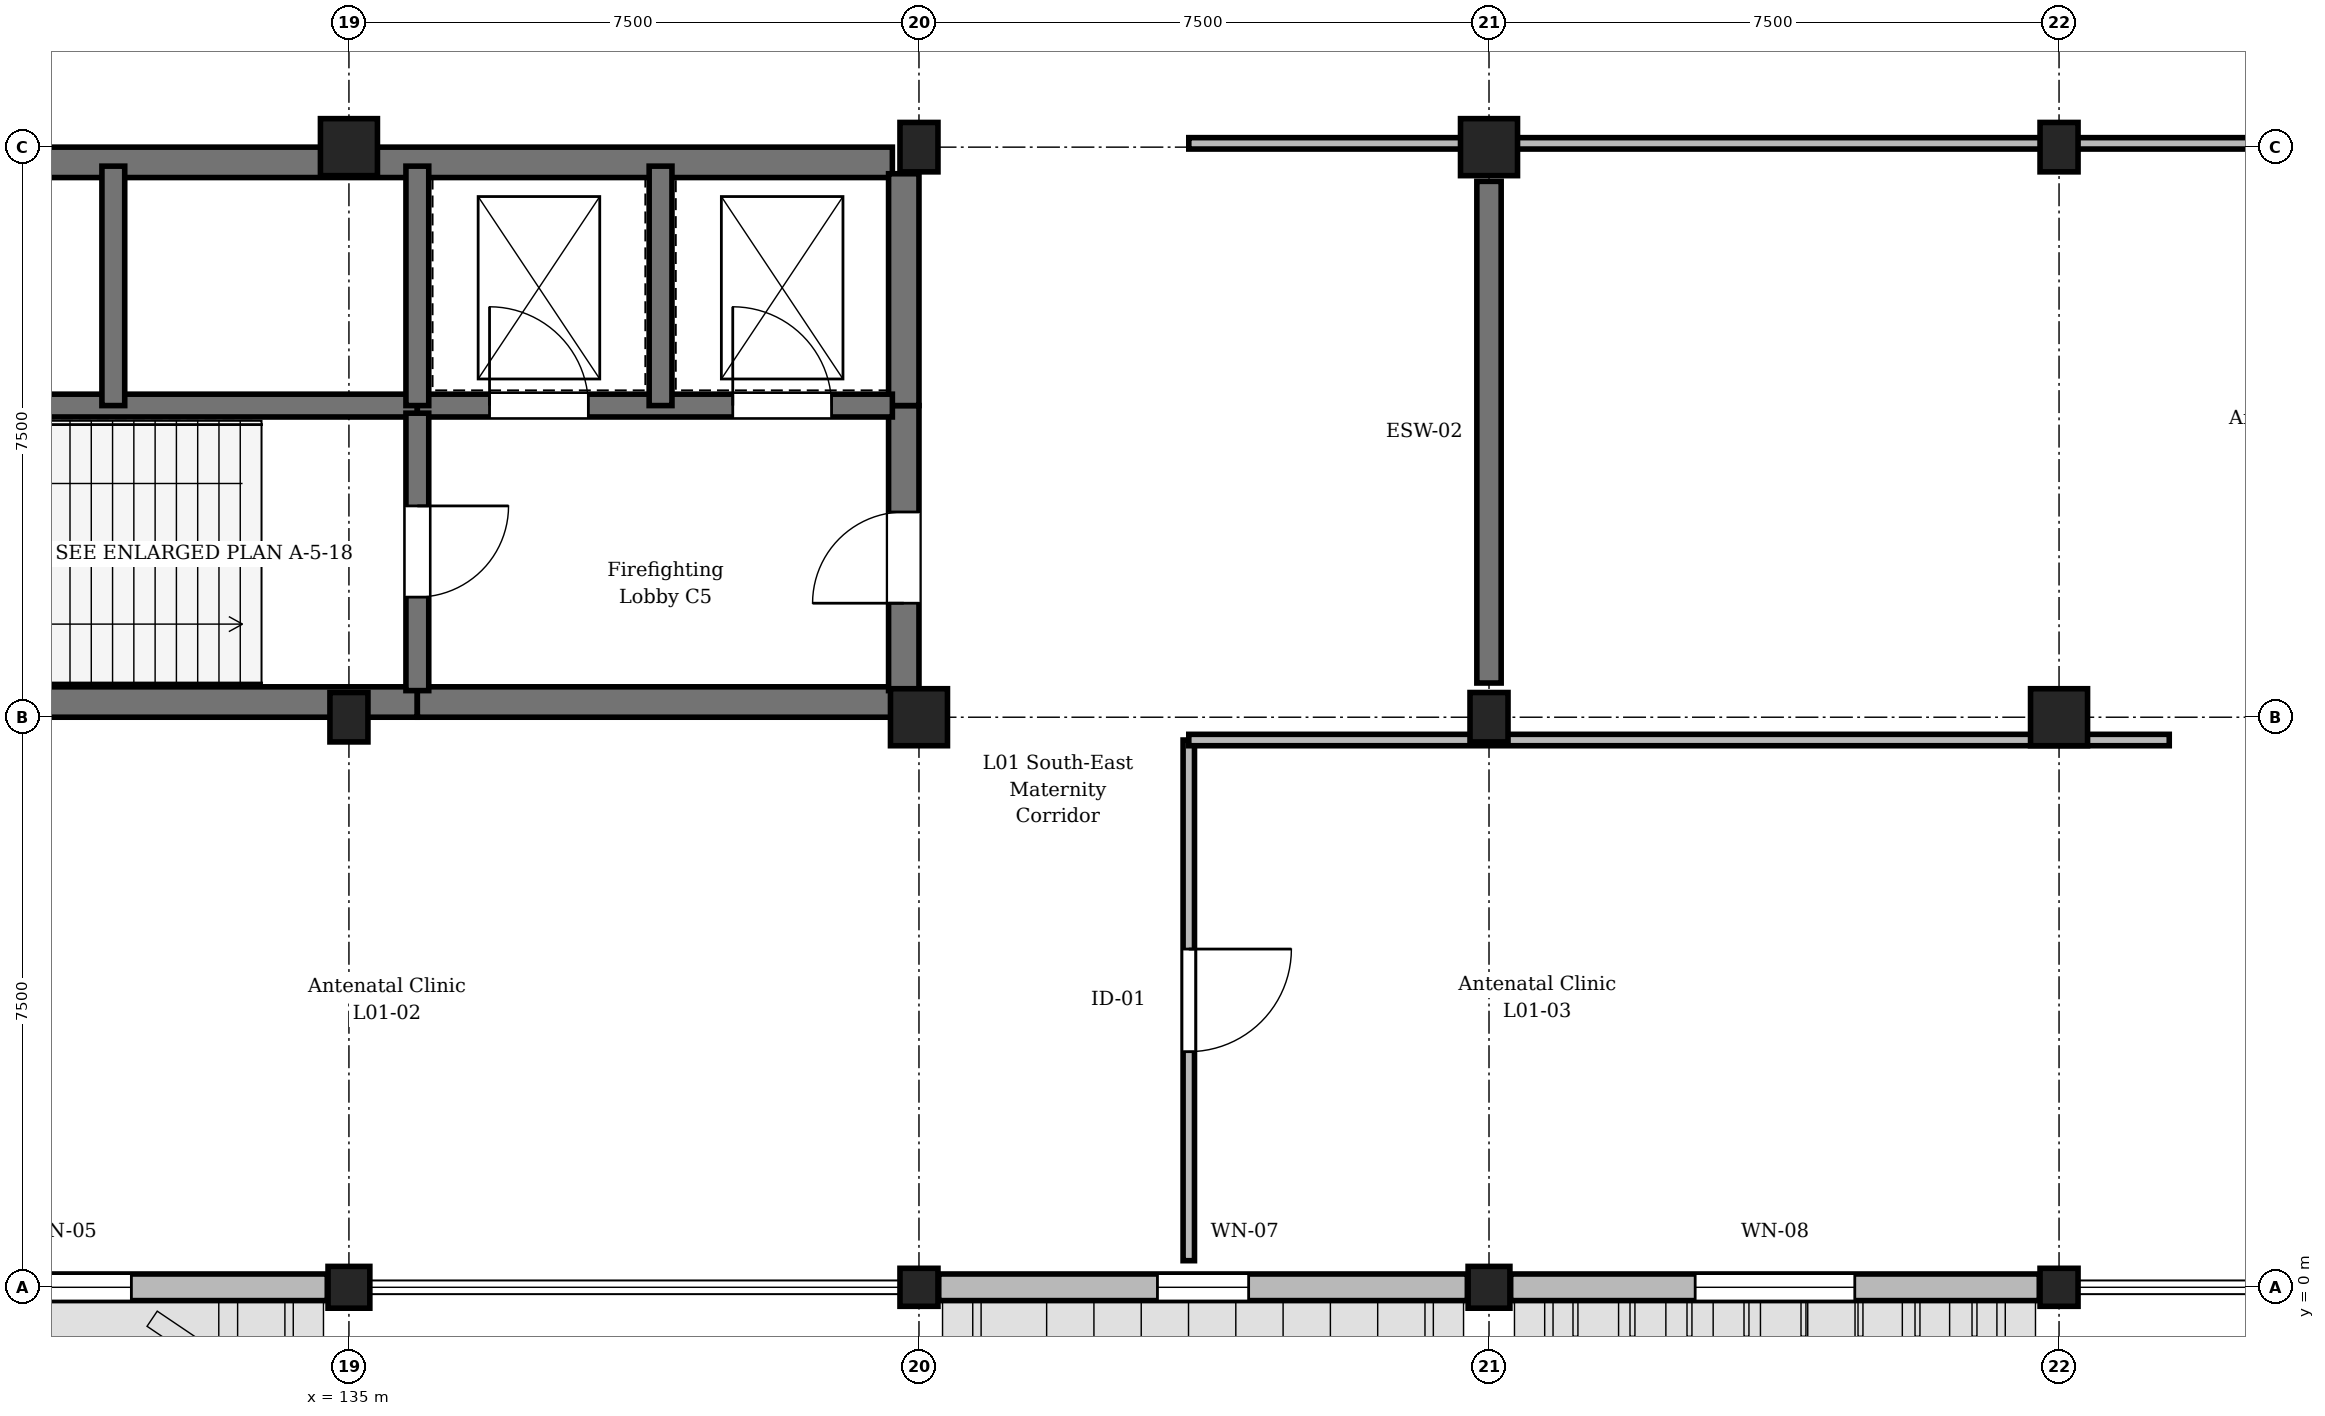
"""IFC4 building model, lengths in metres.
Left out: names, types, materials, properties, quantities, classifications, styles, units other than length and angle.
Written with IfcOpenShell. Run it as: python <this file> out.ifc"""

import sys

from ifc_helpers import new_model, si_unit, direction, frame, frame_2d, origin, origin_2d, place, context, subcontext, project, spatial, rectangle, extrude, element, fill, save


model = new_model("IFC4")
c1 = context("Model", 3, precision=1e-05, world=origin(), true_north=direction((0.0, 1.0)))
c2 = subcontext(c1, "Body", "Model", "MODEL_VIEW")
j1 = project(units=[si_unit("LENGTHUNIT", "METRE"), si_unit("PLANEANGLEUNIT", "RADIAN")], contexts=[c1])
p1 = place(None, origin())
s1 = spatial("IfcSite", under=j1, at=p1, CompositionType="ELEMENT")
p2 = place(p1, origin())
s2 = spatial("IfcBuilding", under=s1, at=p2, CompositionType="ELEMENT")
p3 = place(p2, frame((0.0, 0.0, 4.8)))
s3 = spatial("IfcBuildingStorey", under=s2, at=p3, CompositionType="ELEMENT", Elevation=4.8)
p4 = place(p3, frame((135.0, 0.0, 0.0), z_axis=(0.0, 0.0, 1.0), x_axis=(1.0, 0.0, 0.0)))
e1 = element("IfcColumn", 1, at=p4, inside=s3, PredefinedType="COLUMN", context=c2, shape_type="SweptSolid", body=[
    extrude(rectangle(XDim=0.55, YDim=0.55, at=origin_2d()), origin(), (0.0, 0.0, 1.0), 4.5),
])
p5 = place(p3, frame((135.0, 7.5, 0.0), z_axis=(0.0, 0.0, 1.0), x_axis=(1.0, 0.0, 0.0)))
e2 = element("IfcColumn", 2, at=p5, inside=s3, PredefinedType="COLUMN", context=c2, shape_type="SweptSolid", body=[
    extrude(rectangle(XDim=0.5, YDim=0.65, at=origin_2d()), origin(), (0.0, 0.0, 1.0), 4.5),
])
p6 = place(p3, frame((135.0, 15.0, 0.0), z_axis=(0.0, 0.0, 1.0), x_axis=(1.0, 0.0, 0.0)))
e3 = element("IfcColumn", 3, at=p6, inside=s3, PredefinedType="COLUMN", context=c2, shape_type="SweptSolid", body=[
    extrude(rectangle(XDim=0.75, YDim=0.75, at=origin_2d()), origin(), (0.0, 0.0, 1.0), 4.5),
])
p7 = place(p3, frame((142.5, 0.0, 0.0), z_axis=(0.0, 0.0, 1.0), x_axis=(1.0, 0.0, 0.0)))
e4 = element("IfcColumn", 4, at=p7, inside=s3, PredefinedType="COLUMN", context=c2, shape_type="SweptSolid", body=[
    extrude(rectangle(XDim=0.5, YDim=0.5, at=origin_2d()), origin(), (0.0, 0.0, 1.0), 4.5),
])
p8 = place(p3, frame((142.5, 7.5, 0.0), z_axis=(0.0, 0.0, 1.0), x_axis=(1.0, 0.0, 0.0)))
e5 = element("IfcColumn", 5, at=p8, inside=s3, PredefinedType="COLUMN", context=c2, shape_type="SweptSolid", body=[
    extrude(rectangle(XDim=0.75, YDim=0.75, at=origin_2d()), origin(), (0.0, 0.0, 1.0), 4.5),
])
p9 = place(p3, frame((142.5, 15.0, 0.0), z_axis=(0.0, 0.0, 1.0), x_axis=(1.0, 0.0, 0.0)))
e6 = element("IfcColumn", 6, at=p9, inside=s3, PredefinedType="COLUMN", context=c2, shape_type="SweptSolid", body=[
    extrude(rectangle(XDim=0.5, YDim=0.65, at=origin_2d()), origin(), (0.0, 0.0, 1.0), 4.5),
])
p10 = place(p3, frame((150.0, 0.0, 0.0), z_axis=(0.0, 0.0, 1.0), x_axis=(1.0, 0.0, 0.0)))
e7 = element("IfcColumn", 7, at=p10, inside=s3, PredefinedType="COLUMN", context=c2, shape_type="SweptSolid", body=[
    extrude(rectangle(XDim=0.55, YDim=0.55, at=origin_2d()), origin(), (0.0, 0.0, 1.0), 4.5),
])
p11 = place(p3, frame((150.0, 7.5, 0.0), z_axis=(0.0, 0.0, 1.0), x_axis=(1.0, 0.0, 0.0)))
e8 = element("IfcColumn", 8, at=p11, inside=s3, PredefinedType="COLUMN", context=c2, shape_type="SweptSolid", body=[
    extrude(rectangle(XDim=0.5, YDim=0.65, at=origin_2d()), origin(), (0.0, 0.0, 1.0), 4.5),
])
p12 = place(p3, frame((150.0, 15.0, 0.0), z_axis=(0.0, 0.0, 1.0), x_axis=(1.0, 0.0, 0.0)))
e9 = element("IfcColumn", 9, at=p12, inside=s3, PredefinedType="COLUMN", context=c2, shape_type="SweptSolid", body=[
    extrude(rectangle(XDim=0.75, YDim=0.75, at=origin_2d()), origin(), (0.0, 0.0, 1.0), 4.5),
])
p13 = place(p3, frame((157.5, 0.0, 0.0), z_axis=(0.0, 0.0, 1.0), x_axis=(1.0, 0.0, 0.0)))
e10 = element("IfcColumn", 10, at=p13, inside=s3, PredefinedType="COLUMN", context=c2, shape_type="SweptSolid", body=[
    extrude(rectangle(XDim=0.5, YDim=0.5, at=origin_2d()), origin(), (0.0, 0.0, 1.0), 4.5),
])
p14 = place(p3, frame((157.5, 7.5, 0.0), z_axis=(0.0, 0.0, 1.0), x_axis=(1.0, 0.0, 0.0)))
e11 = element("IfcColumn", 11, at=p14, inside=s3, PredefinedType="COLUMN", context=c2, shape_type="SweptSolid", body=[
    extrude(rectangle(XDim=0.75, YDim=0.75, at=origin_2d()), origin(), (0.0, 0.0, 1.0), 4.5),
])
p15 = place(p3, frame((157.5, 15.0, 0.0), z_axis=(0.0, 0.0, 1.0), x_axis=(1.0, 0.0, 0.0)))
e12 = element("IfcColumn", 12, at=p15, inside=s3, PredefinedType="COLUMN", context=c2, shape_type="SweptSolid", body=[
    extrude(rectangle(XDim=0.5, YDim=0.65, at=origin_2d()), origin(), (0.0, 0.0, 1.0), 4.5),
])
p16 = place(p3, frame((150.0, 7.95, 0.0), z_axis=(0.0, 0.0, 1.0), x_axis=(0.0, 1.0, 0.0)))
e13 = element("IfcWall", 13, at=p16, inside=s3, PredefinedType="SHEAR", context=c2, shape_type="SweptSolid", body=[
    extrude(rectangle(XDim=6.6, YDim=0.32, at=frame_2d((3.3, 0.0))), origin(), (0.0, 0.0, 1.0), 3.63),
])
p17 = place(p3, frame((134.715, 0.0, 0.0), z_axis=(0.0, 0.0, 1.0), x_axis=(-1.0, 0.0, 0.0)))
e14 = element("IfcWall", 14, at=p17, inside=s3, PredefinedType="STANDARD", context=c2, shape_type="SweptSolid", body=[
    extrude(rectangle(XDim=6.955, YDim=0.35, at=frame_2d((3.478, 0.0))), origin(), (0.0, 0.0, 1.0), 3.63),
])
p18 = place(p17, frame((2.577, 0.0, 0.9)))
e15 = element("IfcOpeningElement", 15, at=p18, cuts=e14, PredefinedType="OPENING", context=c2, shape_type="SweptSolid", body=[
    extrude(rectangle(XDim=1.8, YDim=2.1, at=frame_2d((0.9, 1.05))), frame((0.0, 0.185, 0.0), z_axis=(0.0, -1.0, 0.0), x_axis=(1.0, 0.0, 0.0)), (0.0, 0.0, 1.0), 0.37),
])
p19 = place(p3, frame((149.715, 0.0, 0.0), z_axis=(0.0, 0.0, 1.0), x_axis=(-1.0, 0.0, 0.0)))
e16 = element("IfcWall", 16, at=p19, inside=s3, PredefinedType="STANDARD", context=c2, shape_type="SweptSolid", body=[
    extrude(rectangle(XDim=6.955, YDim=0.35, at=frame_2d((3.478, 0.0))), origin(), (0.0, 0.0, 1.0), 3.63),
])
p20 = place(p19, frame((2.877, 0.0, 0.9)))
e17 = element("IfcOpeningElement", 17, at=p20, cuts=e16, PredefinedType="OPENING", context=c2, shape_type="SweptSolid", body=[
    extrude(rectangle(XDim=1.2, YDim=2.1, at=frame_2d((0.6, 1.05))), frame((0.0, 0.185, 0.0), z_axis=(0.0, -1.0, 0.0), x_axis=(1.0, 0.0, 0.0)), (0.0, 0.0, 1.0), 0.37),
])
p21 = place(p3, frame((157.24, 0.0, 0.0), z_axis=(0.0, 0.0, 1.0), x_axis=(-1.0, 0.0, 0.0)))
e18 = element("IfcWall", 18, at=p21, inside=s3, PredefinedType="STANDARD", context=c2, shape_type="SweptSolid", body=[
    extrude(rectangle(XDim=6.955, YDim=0.35, at=frame_2d((3.478, 0.0))), origin(), (0.0, 0.0, 1.0), 3.63),
])
p22 = place(p21, frame((2.427, 0.0, 0.9)))
e19 = element("IfcOpeningElement", 19, at=p22, cuts=e18, PredefinedType="OPENING", context=c2, shape_type="SweptSolid", body=[
    extrude(rectangle(XDim=2.1, YDim=2.1, at=frame_2d((1.05, 1.05))), frame((0.0, 0.185, 0.0), z_axis=(0.0, -1.0, 0.0), x_axis=(1.0, 0.0, 0.0)), (0.0, 0.0, 1.0), 0.37),
])
p23 = place(p3, frame((127.85, 7.7, 0.0), z_axis=(0.0, 0.0, 1.0), x_axis=(1.0, 0.0, 0.0)))
e20 = element("IfcWall", 20, at=p23, inside=s3, PredefinedType="SHEAR", context=c2, shape_type="SweptSolid", body=[
    extrude(rectangle(XDim=8.05, YDim=0.4, at=frame_2d((4.025, 0.0))), origin(), (0.0, 0.0, 1.0), 4.18),
])
p24 = place(p3, frame((135.9, 7.7, 0.0), z_axis=(0.0, 0.0, 1.0), x_axis=(1.0, 0.0, 0.0)))
e21 = element("IfcWall", 21, at=p24, inside=s3, PredefinedType="SHEAR", context=c2, shape_type="SweptSolid", body=[
    extrude(rectangle(XDim=6.25, YDim=0.4, at=frame_2d((3.125, 0.0))), origin(), (0.0, 0.0, 1.0), 4.18),
])
p25 = place(p3, frame((127.85, 14.8, 0.0), z_axis=(0.0, 0.0, 1.0), x_axis=(1.0, 0.0, 0.0)))
e22 = element("IfcWall", 22, at=p25, inside=s3, PredefinedType="SHEAR", context=c2, shape_type="SweptSolid", body=[
    extrude(rectangle(XDim=14.3, YDim=0.4, at=frame_2d((7.15, 0.0))), origin(), (0.0, 0.0, 1.0), 4.18),
])
p26 = place(p3, frame((142.3, 7.85, 0.0), z_axis=(0.0, 0.0, 1.0), x_axis=(0.0, 1.0, 0.0)))
e23 = element("IfcWall", 23, at=p26, inside=s3, PredefinedType="SHEAR", context=c2, shape_type="SweptSolid", body=[
    extrude(rectangle(XDim=3.75, YDim=0.4, at=frame_2d((1.875, 0.0))), origin(), (0.0, 0.0, 1.0), 4.18),
])
p27 = place(p26, frame((1.15, 0.0, 0.0)))
e24 = element("IfcOpeningElement", 24, at=p27, cuts=e23, PredefinedType="OPENING", context=c2, shape_type="SweptSolid", body=[
    extrude(rectangle(XDim=1.2, YDim=2.25, at=frame_2d((0.6, 1.125))), frame((0.0, 0.21, 0.0), z_axis=(0.0, -1.0, 0.0), x_axis=(1.0, 0.0, 0.0)), (0.0, 0.0, 1.0), 0.42),
])
p28 = place(p3, frame((142.3, 11.6, 0.0), z_axis=(0.0, 0.0, 1.0), x_axis=(0.0, 1.0, 0.0)))
e25 = element("IfcWall", 25, at=p28, inside=s3, PredefinedType="SHEAR", context=c2, shape_type="SweptSolid", body=[
    extrude(rectangle(XDim=3.05, YDim=0.4, at=frame_2d((1.525, 0.0))), origin(), (0.0, 0.0, 1.0), 4.18),
])
p29 = place(p3, frame((127.85, 11.6, 0.0), z_axis=(0.0, 0.0, 1.0), x_axis=(1.0, 0.0, 0.0)))
e26 = element("IfcWall", 26, at=p29, inside=s3, PredefinedType="SHEAR", context=c2, shape_type="SweptSolid", body=[
    extrude(rectangle(XDim=8.05, YDim=0.3, at=frame_2d((4.025, 0.0))), origin(), (0.0, 0.0, 1.0), 4.18),
])
p30 = place(p3, frame((135.9, 11.6, 0.0), z_axis=(0.0, 0.0, 1.0), x_axis=(1.0, 0.0, 0.0)))
e27 = element("IfcWall", 27, at=p30, inside=s3, PredefinedType="SHEAR", context=c2, shape_type="SweptSolid", body=[
    extrude(rectangle(XDim=6.25, YDim=0.3, at=frame_2d((3.125, 0.0))), origin(), (0.0, 0.0, 1.0), 4.18),
])
p31 = place(p30, frame((0.95, 0.0, 0.0)))
e28 = element("IfcOpeningElement", 28, at=p31, cuts=e27, PredefinedType="OPENING", context=c2, shape_type="SweptSolid", body=[
    extrude(rectangle(XDim=1.3, YDim=2.2, at=frame_2d((0.65, 1.1))), frame((0.0, 0.16, 0.0), z_axis=(0.0, -1.0, 0.0), x_axis=(1.0, 0.0, 0.0)), (0.0, 0.0, 1.0), 0.32),
])
p32 = place(p30, frame((4.15, 0.0, 0.0)))
e29 = element("IfcOpeningElement", 29, at=p32, cuts=e27, PredefinedType="OPENING", context=c2, shape_type="SweptSolid", body=[
    extrude(rectangle(XDim=1.3, YDim=2.2, at=frame_2d((0.65, 1.1))), frame((0.0, 0.16, 0.0), z_axis=(0.0, -1.0, 0.0), x_axis=(1.0, 0.0, 0.0)), (0.0, 0.0, 1.0), 0.32),
])
p33 = place(p3, frame((135.9, 11.5, 0.0), z_axis=(0.0, 0.0, 1.0), x_axis=(0.0, -1.0, 0.0)))
e30 = element("IfcWall", 30, at=p33, inside=s3, PredefinedType="SHEAR", context=c2, shape_type="SweptSolid", body=[
    extrude(rectangle(XDim=3.65, YDim=0.3, at=frame_2d((1.825, 0.0))), origin(), (0.0, 0.0, 1.0), 4.18),
])
p34 = place(p33, frame((1.22, 0.0, 0.0)))
e31 = element("IfcOpeningElement", 31, at=p34, cuts=e30, PredefinedType="OPENING", context=c2, shape_type="SweptSolid", body=[
    extrude(rectangle(XDim=1.2, YDim=2.25, at=frame_2d((0.6, 1.125))), frame((0.0, 0.16, 0.0), z_axis=(0.0, -1.0, 0.0), x_axis=(1.0, 0.0, 0.0)), (0.0, 0.0, 1.0), 0.32),
])
for number, where, z_axis, x_axis in (
    (32, (131.9, 11.6, 0.0), (0.0, 0.0, 1.0), (0.0, 1.0, 0.0)),
    (33, (135.9, 11.6, 0.0), (0.0, 0.0, 1.0), (0.0, 1.0, 0.0)),
    (34, (139.1, 11.6, 0.0), (0.0, 0.0, 1.0), (0.0, 1.0, 0.0)),
):
    element("IfcWall", number, at=place(p3, frame(where, z_axis=z_axis, x_axis=x_axis)), inside=s3, PredefinedType="SHEAR", context=c2, shape_type="SweptSolid", body=[
        extrude(rectangle(XDim=3.15, YDim=0.3, at=frame_2d((1.575, 0.0))), origin(), (0.0, 0.0, 1.0), 4.18),
    ])
p35 = place(p3, frame((146.05, 7.2, 0.0), z_axis=(0.0, 0.0, 1.0), x_axis=(0.0, -1.0, 0.0)))
e35 = element("IfcWall", 35, at=p35, inside=s3, PredefinedType="PARTITIONING", context=c2, shape_type="SweptSolid", body=[
    extrude(rectangle(XDim=6.85, YDim=0.15, at=frame_2d((3.425, 0.0))), origin(), (0.0, 0.0, 1.0), 4.165),
])
p36 = place(p35, frame((2.75, 0.0, 0.0)))
e36 = element("IfcOpeningElement", 36, at=p36, cuts=e35, PredefinedType="OPENING", context=c2, shape_type="SweptSolid", body=[
    extrude(rectangle(XDim=1.35, YDim=2.25, at=frame_2d((0.675, 1.125))), frame((0.0, 0.085, 0.0), z_axis=(0.0, -1.0, 0.0), x_axis=(1.0, 0.0, 0.0)), (0.0, 0.0, 1.0), 0.17),
])
p37 = place(p3, frame((172.15, 15.05, 0.0), z_axis=(0.0, 0.0, 1.0), x_axis=(-1.0, 0.0, 0.0)))
e37 = element("IfcWall", 37, at=p37, inside=s3, PredefinedType="PARTITIONING", context=c2, shape_type="SweptSolid", body=[
    extrude(rectangle(XDim=26.1, YDim=0.15, at=frame_2d((13.05, 0.0))), origin(), (0.0, 0.0, 1.0), 3.515),
])
p38 = place(p37, frame((2.675, 0.0, 0.0)))
e38 = element("IfcOpeningElement", 38, at=p38, cuts=e37, PredefinedType="OPENING", context=c2, shape_type="SweptSolid", body=[
    extrude(rectangle(XDim=1.35, YDim=2.25, at=frame_2d((0.675, 1.125))), frame((0.0, 0.085, 0.0), z_axis=(0.0, -1.0, 0.0), x_axis=(1.0, 0.0, 0.0)), (0.0, 0.0, 1.0), 0.17),
])
p39 = place(p3, frame((146.05, 7.2, 0.0), z_axis=(0.0, 0.0, 1.0), x_axis=(1.0, 0.0, 0.0)))
e39 = element("IfcWall", 39, at=p39, inside=s3, PredefinedType="PARTITIONING", context=c2, shape_type="SweptSolid", body=[
    extrude(rectangle(XDim=12.9, YDim=0.15, at=frame_2d((6.45, 0.0))), origin(), (0.0, 0.0, 1.0), 3.515),
])
p40 = place(p18, origin())
e40 = element("IfcWindow", 40, at=p40, inside=s3, PartitioningType="SINGLE_PANEL", PredefinedType="WINDOW", context=c2, shape_type="SweptSolid", body=[
    extrude(rectangle(XDim=1.8, YDim=2.1, at=frame_2d((0.9, 1.05))), frame((0.0, 0.03, 0.0), z_axis=(0.0, -1.0, 0.0), x_axis=(1.0, 0.0, 0.0)), (0.0, 0.0, 1.0), 0.06),
])
fill(e15, e40)
p41 = place(p20, origin())
e41 = element("IfcWindow", 41, at=p41, inside=s3, PartitioningType="SINGLE_PANEL", PredefinedType="WINDOW", context=c2, shape_type="SweptSolid", body=[
    extrude(rectangle(XDim=1.2, YDim=2.1, at=frame_2d((0.6, 1.05))), frame((0.0, 0.03, 0.0), z_axis=(0.0, -1.0, 0.0), x_axis=(1.0, 0.0, 0.0)), (0.0, 0.0, 1.0), 0.06),
])
fill(e17, e41)
p42 = place(p22, origin())
e42 = element("IfcWindow", 42, at=p42, inside=s3, PartitioningType="SINGLE_PANEL", PredefinedType="WINDOW", context=c2, shape_type="SweptSolid", body=[
    extrude(rectangle(XDim=2.1, YDim=2.1, at=frame_2d((1.05, 1.05))), frame((0.0, 0.03, 0.0), z_axis=(0.0, -1.0, 0.0), x_axis=(1.0, 0.0, 0.0)), (0.0, 0.0, 1.0), 0.06),
])
fill(e19, e42)
p43 = place(p27, origin())
e43 = element("IfcDoor", 43, at=p43, inside=s3, OperationType="SINGLE_SWING_LEFT", PredefinedType="DOOR", context=c2, shape_type="SweptSolid", body=[
    extrude(rectangle(XDim=1.2, YDim=2.25, at=frame_2d((0.6, 1.125))), frame((0.0, 0.025, 0.0), z_axis=(0.0, -1.0, 0.0), x_axis=(1.0, 0.0, 0.0)), (0.0, 0.0, 1.0), 0.05),
])
fill(e24, e43)
p44 = place(p31, origin())
e44 = element("IfcDoor", 44, at=p44, inside=s3, OperationType="DOUBLE_DOOR_SLIDING", PredefinedType="DOOR", context=c2, shape_type="SweptSolid", body=[
    extrude(rectangle(XDim=1.3, YDim=2.2, at=frame_2d((0.65, 1.1))), frame((0.0, 0.025, 0.0), z_axis=(0.0, -1.0, 0.0), x_axis=(1.0, 0.0, 0.0)), (0.0, 0.0, 1.0), 0.05),
])
fill(e28, e44)
p45 = place(p32, origin())
e45 = element("IfcDoor", 45, at=p45, inside=s3, OperationType="DOUBLE_DOOR_SLIDING", PredefinedType="DOOR", context=c2, shape_type="SweptSolid", body=[
    extrude(rectangle(XDim=1.3, YDim=2.2, at=frame_2d((0.65, 1.1))), frame((0.0, 0.025, 0.0), z_axis=(0.0, -1.0, 0.0), x_axis=(1.0, 0.0, 0.0)), (0.0, 0.0, 1.0), 0.05),
])
fill(e29, e45)
p46 = place(p34, origin())
e46 = element("IfcDoor", 46, at=p46, inside=s3, OperationType="SINGLE_SWING_LEFT", PredefinedType="DOOR", context=c2, shape_type="SweptSolid", body=[
    extrude(rectangle(XDim=1.2, YDim=2.25, at=frame_2d((0.6, 1.125))), frame((0.0, 0.025, 0.0), z_axis=(0.0, -1.0, 0.0), x_axis=(1.0, 0.0, 0.0)), (0.0, 0.0, 1.0), 0.05),
])
fill(e31, e46)
p47 = place(p36, origin())
e47 = element("IfcDoor", 47, at=p47, inside=s3, OperationType="SINGLE_SWING_LEFT", PredefinedType="DOOR", context=c2, shape_type="SweptSolid", body=[
    extrude(rectangle(XDim=1.35, YDim=2.25, at=frame_2d((0.675, 1.125))), frame((0.0, 0.025, 0.0), z_axis=(0.0, -1.0, 0.0), x_axis=(1.0, 0.0, 0.0)), (0.0, 0.0, 1.0), 0.05),
])
fill(e36, e47)
save(model, sys.argv[1])
